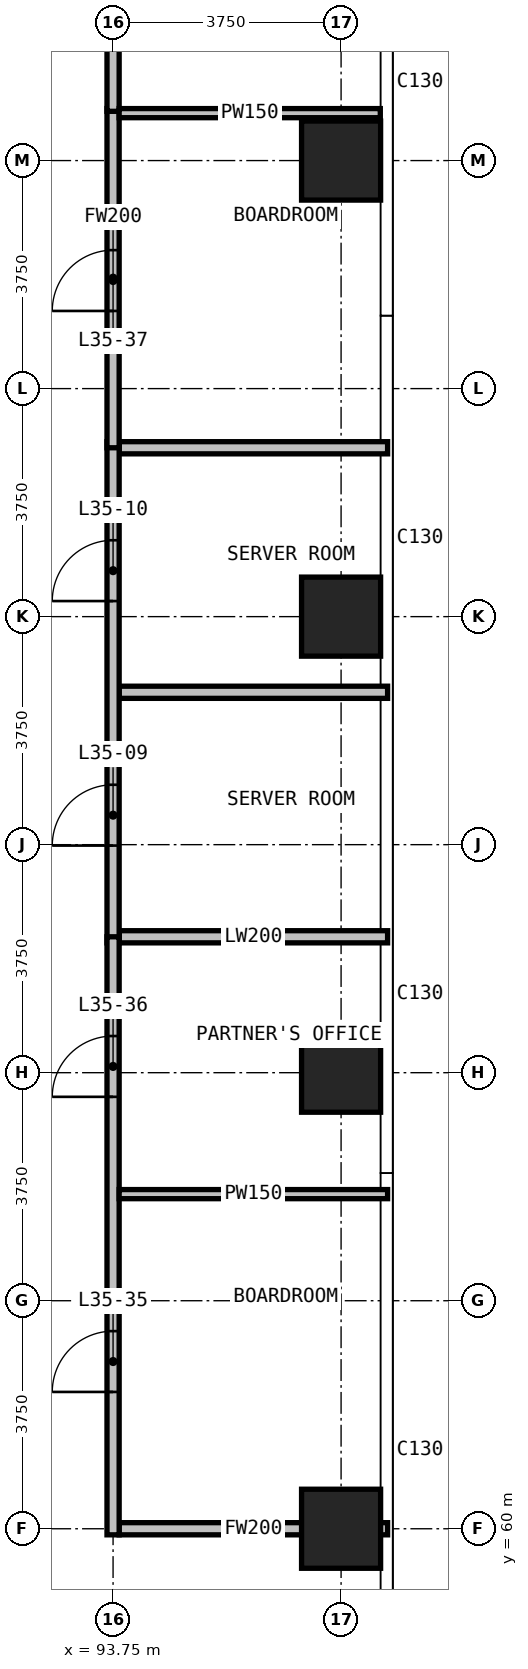
"""IFC4 building model, lengths in metres.
Left out: names, types, materials, properties, quantities, classifications, styles, units other than length and angle.
Written with IfcOpenShell. Run it as: python <this file> out.ifc"""

import sys

from ifc_helpers import new_model, si_unit, direction, frame, frame_2d, origin, origin_2d, place, context, subcontext, project, spatial, rectangle, extrude, element, fill, save


model = new_model("IFC4")
c1 = context("Model", 3, precision=1e-05, world=origin(), true_north=direction((0.0, 1.0)))
c2 = subcontext(c1, "Body", "Model", "MODEL_VIEW")
j1 = project(units=[si_unit("LENGTHUNIT", "METRE"), si_unit("PLANEANGLEUNIT", "RADIAN")], contexts=[c1])
p1 = place(None, origin())
s1 = spatial("IfcSite", under=j1, at=p1, CompositionType="ELEMENT")
p2 = place(p1, origin())
s2 = spatial("IfcBuilding", under=s1, at=p2, CompositionType="ELEMENT")
p3 = place(p2, frame((0.0, 0.0, 139.6)))
s3 = spatial("IfcBuildingStorey", under=s2, at=p3, CompositionType="ELEMENT", Elevation=139.6)
for number, where, z_axis, x_axis in (
    (1, (97.5, 60.0, 0.0), (0.0, 0.0, 1.0), (1.0, 0.0, 0.0)),
    (2, (97.5, 67.5, 0.0), (0.0, 0.0, 1.0), (1.0, 0.0, 0.0)),
    (3, (97.5, 75.0, 0.0), (0.0, 0.0, 1.0), (1.0, 0.0, 0.0)),
    (4, (97.5, 82.5, 0.0), (0.0, 0.0, 1.0), (1.0, 0.0, 0.0)),
):
    element("IfcColumn", number, at=place(p3, frame(where, z_axis=z_axis, x_axis=x_axis)), inside=s3, PredefinedType="COLUMN", context=c2, shape_type="SweptSolid", body=[
        extrude(rectangle(XDim=1.3, YDim=1.3, at=origin_2d()), origin(), (0.0, 0.0, 1.0), 3.6),
    ])
for number, where, z_axis, x_axis in (
    (5, (93.85, 69.735, 0.0), (0.0, 0.0, 1.0), (1.0, 0.0, 0.0)),
    (6, (93.85, 73.756, 0.0), (0.0, 0.0, 1.0), (1.0, 0.0, 0.0)),
    (7, (93.85, 77.777, 0.0), (0.0, 0.0, 1.0), (1.0, 0.0, 0.0)),
):
    element("IfcWall", number, at=place(p3, frame(where, z_axis=z_axis, x_axis=x_axis)), inside=s3, PredefinedType="PARTITIONING", context=c2, shape_type="SweptSolid", body=[
        extrude(rectangle(XDim=4.415, YDim=0.2, at=frame_2d((2.208, 0.0))), origin(), (0.0, 0.0, 1.0), 3.3),
    ])
p4 = place(p3, frame((93.75, 69.635, 0.0), z_axis=(0.0, 0.0, 1.0), x_axis=(0.0, 1.0, 0.0)))
e8 = element("IfcWall", 8, at=p4, inside=s3, PredefinedType="PARTITIONING", context=c2, shape_type="SweptSolid", body=[
    extrude(rectangle(XDim=8.242, YDim=0.2, at=frame_2d((4.121, 0.0))), origin(), (0.0, 0.0, 1.0), 3.3),
])
p5 = place(p4, frame((1.6, 0.0, 0.0)))
e9 = element("IfcOpeningElement", 9, at=p5, cuts=e8, PredefinedType="OPENING", context=c2, shape_type="SweptSolid", body=[
    extrude(rectangle(XDim=1.0, YDim=2.2, at=frame_2d((0.5, 1.1))), frame((0.0, 0.11, 0.0), z_axis=(0.0, -1.0, 0.0), x_axis=(1.0, 0.0, 0.0)), (0.0, 0.0, 1.0), 0.22),
])
p6 = place(p4, frame((5.621, 0.0, 0.0)))
e10 = element("IfcOpeningElement", 10, at=p6, cuts=e8, PredefinedType="OPENING", context=c2, shape_type="SweptSolid", body=[
    extrude(rectangle(XDim=1.0, YDim=2.2, at=frame_2d((0.5, 1.1))), frame((0.0, 0.11, 0.0), z_axis=(0.0, -1.0, 0.0), x_axis=(1.0, 0.0, 0.0)), (0.0, 0.0, 1.0), 0.22),
])
p7 = place(p3, frame((93.85, 60.0, 0.0), z_axis=(0.0, 0.0, 1.0), x_axis=(1.0, 0.0, 0.0)))
e11 = element("IfcWall", 11, at=p7, inside=s3, PredefinedType="PARTITIONING", context=c2, shape_type="SweptSolid", body=[
    extrude(rectangle(XDim=4.415, YDim=0.2, at=frame_2d((2.208, 0.0))), origin(), (0.0, 0.0, 1.0), 3.3),
])
p8 = place(p3, frame((93.75, 59.9, 0.0), z_axis=(0.0, 0.0, 1.0), x_axis=(0.0, 1.0, 0.0)))
e12 = element("IfcWall", 12, at=p8, inside=s3, PredefinedType="PARTITIONING", context=c2, shape_type="SweptSolid", body=[
    extrude(rectangle(XDim=9.835, YDim=0.2, at=frame_2d((4.917, 0.0))), origin(), (0.0, 0.0, 1.0), 3.3),
])
p9 = place(p8, frame((2.35, 0.0, 0.0)))
e13 = element("IfcOpeningElement", 13, at=p9, cuts=e12, PredefinedType="OPENING", context=c2, shape_type="SweptSolid", body=[
    extrude(rectangle(XDim=1.0, YDim=2.2, at=frame_2d((0.5, 1.1))), frame((0.0, 0.11, 0.0), z_axis=(0.0, -1.0, 0.0), x_axis=(1.0, 0.0, 0.0)), (0.0, 0.0, 1.0), 0.22),
])
p10 = place(p8, frame((7.203, 0.0, 0.0)))
e14 = element("IfcOpeningElement", 14, at=p10, cuts=e12, PredefinedType="OPENING", context=c2, shape_type="SweptSolid", body=[
    extrude(rectangle(XDim=1.0, YDim=2.2, at=frame_2d((0.5, 1.1))), frame((0.0, 0.11, 0.0), z_axis=(0.0, -1.0, 0.0), x_axis=(1.0, 0.0, 0.0)), (0.0, 0.0, 1.0), 0.22),
])
p11 = place(p3, frame((93.75, 77.777, 0.0), z_axis=(0.0, 0.0, 1.0), x_axis=(0.0, 1.0, 0.0)))
e15 = element("IfcWall", 15, at=p11, inside=s3, PredefinedType="PARTITIONING", context=c2, shape_type="SweptSolid", body=[
    extrude(rectangle(XDim=5.578, YDim=0.2, at=frame_2d((2.789, 0.0))), origin(), (0.0, 0.0, 1.0), 3.3),
])
p12 = place(p11, frame((2.25, 0.0, 0.0)))
e16 = element("IfcOpeningElement", 16, at=p12, cuts=e15, PredefinedType="OPENING", context=c2, shape_type="SweptSolid", body=[
    extrude(rectangle(XDim=1.0, YDim=2.2, at=frame_2d((0.5, 1.1))), frame((0.0, 0.11, 0.0), z_axis=(0.0, -1.0, 0.0), x_axis=(1.0, 0.0, 0.0)), (0.0, 0.0, 1.0), 0.22),
])
p13 = place(p3, frame((93.75, 83.31, 0.0), z_axis=(0.0, 0.0, 1.0), x_axis=(0.0, 1.0, 0.0)))
e17 = element("IfcWall", 17, at=p13, inside=s3, PredefinedType="PARTITIONING", context=c2, shape_type="SweptSolid", body=[
    extrude(rectangle(XDim=7.335, YDim=0.2, at=frame_2d((3.667, 0.0))), origin(), (0.0, 0.0, 1.0), 3.3),
])
p14 = place(p3, frame((93.85, 65.503, 0.0), z_axis=(0.0, 0.0, 1.0), x_axis=(1.0, 0.0, 0.0)))
e18 = element("IfcWall", 18, at=p14, inside=s3, PredefinedType="PARTITIONING", context=c2, shape_type="SweptSolid", body=[
    extrude(rectangle(XDim=4.415, YDim=0.15, at=frame_2d((2.208, 0.0))), origin(), (0.0, 0.0, 1.0), 3.3),
])
p15 = place(p3, frame((93.85, 83.28, 0.0), z_axis=(0.0, 0.0, 1.0), x_axis=(1.0, 0.0, 0.0)))
e19 = element("IfcWall", 19, at=p15, inside=s3, PredefinedType="PARTITIONING", context=c2, shape_type="SweptSolid", body=[
    extrude(rectangle(XDim=4.295, YDim=0.15, at=frame_2d((2.147, 0.0))), origin(), (0.0, 0.0, 1.0), 3.3),
])
p16 = place(p5, origin())
e20 = element("IfcDoor", 20, at=p16, inside=s3, OperationType="SINGLE_SWING_RIGHT", PredefinedType="DOOR", context=c2, shape_type="SweptSolid", body=[
    extrude(rectangle(XDim=1.0, YDim=2.2, at=frame_2d((0.5, 1.1))), frame((0.0, 0.025, 0.0), z_axis=(0.0, -1.0, 0.0), x_axis=(1.0, 0.0, 0.0)), (0.0, 0.0, 1.0), 0.05),
])
fill(e9, e20)
p17 = place(p6, origin())
e21 = element("IfcDoor", 21, at=p17, inside=s3, OperationType="SINGLE_SWING_LEFT", PredefinedType="DOOR", context=c2, shape_type="SweptSolid", body=[
    extrude(rectangle(XDim=1.0, YDim=2.2, at=frame_2d((0.5, 1.1))), frame((0.0, 0.025, 0.0), z_axis=(0.0, -1.0, 0.0), x_axis=(1.0, 0.0, 0.0)), (0.0, 0.0, 1.0), 0.05),
])
fill(e10, e21)
p18 = place(p9, origin())
e22 = element("IfcDoor", 22, at=p18, inside=s3, OperationType="SINGLE_SWING_LEFT", PredefinedType="DOOR", context=c2, shape_type="SweptSolid", body=[
    extrude(rectangle(XDim=1.0, YDim=2.2, at=frame_2d((0.5, 1.1))), frame((0.0, 0.025, 0.0), z_axis=(0.0, -1.0, 0.0), x_axis=(1.0, 0.0, 0.0)), (0.0, 0.0, 1.0), 0.05),
])
fill(e13, e22)
p19 = place(p10, origin())
e23 = element("IfcDoor", 23, at=p19, inside=s3, OperationType="SINGLE_SWING_LEFT", PredefinedType="DOOR", context=c2, shape_type="SweptSolid", body=[
    extrude(rectangle(XDim=1.0, YDim=2.2, at=frame_2d((0.5, 1.1))), frame((0.0, 0.025, 0.0), z_axis=(0.0, -1.0, 0.0), x_axis=(1.0, 0.0, 0.0)), (0.0, 0.0, 1.0), 0.05),
])
fill(e14, e23)
p20 = place(p12, origin())
e24 = element("IfcDoor", 24, at=p20, inside=s3, OperationType="SINGLE_SWING_RIGHT", PredefinedType="DOOR", context=c2, shape_type="SweptSolid", body=[
    extrude(rectangle(XDim=1.0, YDim=2.2, at=frame_2d((0.5, 1.1))), frame((0.0, 0.025, 0.0), z_axis=(0.0, -1.0, 0.0), x_axis=(1.0, 0.0, 0.0)), (0.0, 0.0, 1.0), 0.05),
])
fill(e16, e24)
save(model, sys.argv[1])
